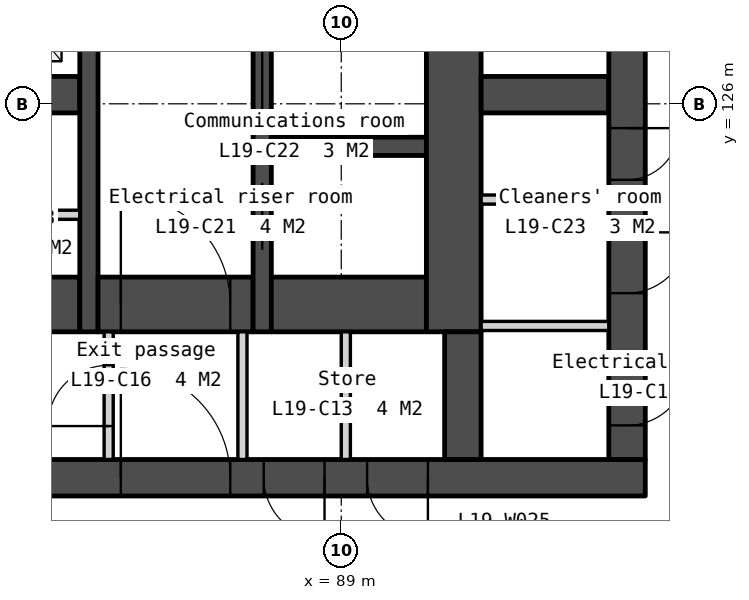
"""IFC4 building model, lengths in metres.
Left out: names, types, materials, properties, quantities, classifications, styles, units other than length and angle.
Written with IfcOpenShell. Run it as: python <this file> out.ifc"""

import sys

from ifc_helpers import new_model, si_unit, direction, frame, frame_2d, origin, place, context, subcontext, project, spatial, polyline, rectangle, outline, extrude, element, fill, save


model = new_model("IFC4")
c1 = context("Model", 3, precision=1e-05, world=origin(), true_north=direction((0.0, 1.0)))
c2 = subcontext(c1, "Body", "Model", "MODEL_VIEW")
j1 = project(units=[si_unit("LENGTHUNIT", "METRE"), si_unit("PLANEANGLEUNIT", "RADIAN")], contexts=[c1])
p1 = place(None, origin())
s1 = spatial("IfcSite", under=j1, at=p1, CompositionType="ELEMENT")
p2 = place(p1, origin())
s2 = spatial("IfcBuilding", under=s1, at=p2, CompositionType="ELEMENT")
p3 = place(p2, frame((0.0, 0.0, 81.8)))
s3 = spatial("IfcBuildingStorey", under=s2, at=p3, CompositionType="ELEMENT", Elevation=81.8)
p4 = place(p3, frame((66.0, 119.85, 0.0), z_axis=(0.0, 0.0, 1.0), x_axis=(1.0, 0.0, 0.0)))
e1 = element("IfcWall", 1, at=p4, inside=s3, PredefinedType="SOLIDWALL", context=c2, shape_type="SweptSolid", body=[
    extrude(rectangle(XDim=28.0, YDim=0.6, at=frame_2d((14.0, 0.0))), origin(), (0.0, 0.0, 1.0), 3.35),
])
p5 = place(p4, frame((6.825, 0.0, 0.0)))
e2 = element("IfcOpeningElement", 2, at=p5, cuts=e1, PredefinedType="OPENING", context=c2, shape_type="SweptSolid", body=[
    extrude(rectangle(XDim=1.8, YDim=2.1, at=frame_2d((0.9, 1.05))), frame((0.0, 0.31, 0.0), z_axis=(0.0, -1.0, 0.0), x_axis=(1.0, 0.0, 0.0)), (0.0, 0.0, 1.0), 0.62),
])
p6 = place(p4, frame((15.85, 0.0, 0.0)))
e3 = element("IfcOpeningElement", 3, at=p6, cuts=e1, PredefinedType="OPENING", context=c2, shape_type="SweptSolid", body=[
    extrude(rectangle(XDim=1.5, YDim=2.1, at=frame_2d((0.75, 1.05))), frame((0.0, 0.31, 0.0), z_axis=(0.0, -1.0, 0.0), x_axis=(1.0, 0.0, 0.0)), (0.0, 0.0, 1.0), 0.62),
])
p7 = place(p4, frame((19.375, 0.0, 0.0)))
e4 = element("IfcOpeningElement", 4, at=p7, cuts=e1, PredefinedType="OPENING", context=c2, shape_type="SweptSolid", body=[
    extrude(rectangle(XDim=1.8, YDim=2.1, at=frame_2d((0.9, 1.05))), frame((0.0, 0.31, 0.0), z_axis=(0.0, -1.0, 0.0), x_axis=(1.0, 0.0, 0.0)), (0.0, 0.0, 1.0), 0.62),
])
p8 = place(p4, frame((4.425, 0.0, 0.0)))
e5 = element("IfcOpeningElement", 5, at=p8, cuts=e1, PredefinedType="OPENING", context=c2, shape_type="SweptSolid", body=[
    extrude(rectangle(XDim=1.0, YDim=2.1, at=frame_2d((0.5, 1.05))), frame((0.0, 0.31, 0.0), z_axis=(0.0, -1.0, 0.0), x_axis=(1.0, 0.0, 0.0)), (0.0, 0.0, 1.0), 0.62),
])
p9 = place(p4, frame((9.783, 0.0, 0.0)))
e6 = element("IfcOpeningElement", 6, at=p9, cuts=e1, PredefinedType="OPENING", context=c2, shape_type="SweptSolid", body=[
    extrude(rectangle(XDim=1.0, YDim=2.1, at=frame_2d((0.5, 1.05))), frame((0.0, 0.31, 0.0), z_axis=(0.0, -1.0, 0.0), x_axis=(1.0, 0.0, 0.0)), (0.0, 0.0, 1.0), 0.62),
])
p10 = place(p4, frame((11.525, 0.0, 0.0)))
e7 = element("IfcOpeningElement", 7, at=p10, cuts=e1, PredefinedType="OPENING", context=c2, shape_type="SweptSolid", body=[
    extrude(rectangle(XDim=1.0, YDim=2.1, at=frame_2d((0.5, 1.05))), frame((0.0, 0.31, 0.0), z_axis=(0.0, -1.0, 0.0), x_axis=(1.0, 0.0, 0.0)), (0.0, 0.0, 1.0), 0.62),
])
p11 = place(p4, frame((13.658, 0.0, 0.0)))
e8 = element("IfcOpeningElement", 8, at=p11, cuts=e1, PredefinedType="OPENING", context=c2, shape_type="SweptSolid", body=[
    extrude(rectangle(XDim=1.0, YDim=2.1, at=frame_2d((0.5, 1.05))), frame((0.0, 0.31, 0.0), z_axis=(0.0, -1.0, 0.0), x_axis=(1.0, 0.0, 0.0)), (0.0, 0.0, 1.0), 0.62),
])
p12 = place(p4, frame((21.725, 0.0, 0.0)))
e9 = element("IfcOpeningElement", 9, at=p12, cuts=e1, PredefinedType="OPENING", context=c2, shape_type="SweptSolid", body=[
    extrude(rectangle(XDim=1.0, YDim=2.1, at=frame_2d((0.5, 1.05))), frame((0.0, 0.31, 0.0), z_axis=(0.0, -1.0, 0.0), x_axis=(1.0, 0.0, 0.0)), (0.0, 0.0, 1.0), 0.62),
])
p13 = place(p4, frame((23.425, 0.0, 0.0)))
e10 = element("IfcOpeningElement", 10, at=p13, cuts=e1, PredefinedType="OPENING", context=c2, shape_type="SweptSolid", body=[
    extrude(rectangle(XDim=1.0, YDim=2.1, at=frame_2d((0.5, 1.05))), frame((0.0, 0.31, 0.0), z_axis=(0.0, -1.0, 0.0), x_axis=(1.0, 0.0, 0.0)), (0.0, 0.0, 1.0), 0.62),
])
p14 = place(p3, frame((81.8, 122.7, 0.0), z_axis=(0.0, 0.0, 1.0), x_axis=(1.0, 0.0, 0.0)))
e11 = element("IfcWall", 11, at=p14, inside=s3, PredefinedType="SOLIDWALL", context=c2, shape_type="SweptSolid", body=[
    extrude(rectangle(XDim=2.9, YDim=0.9, at=frame_2d((1.45, 0.0))), origin(), (0.0, 0.0, 1.0), 3.35),
])
p15 = place(p14, frame((0.05, 0.0, 0.0)))
e12 = element("IfcOpeningElement", 12, at=p15, cuts=e11, PredefinedType="OPENING", context=c2, shape_type="SweptSolid", body=[
    extrude(rectangle(XDim=1.5, YDim=2.1, at=frame_2d((0.75, 1.05))), frame((0.0, 0.46, 0.0), z_axis=(0.0, -1.0, 0.0), x_axis=(1.0, 0.0, 0.0)), (0.0, 0.0, 1.0), 0.92),
])
p16 = place(p3, frame((82.6, 126.15, 0.0), z_axis=(0.0, 0.0, 1.0), x_axis=(1.0, 0.0, 0.0)))
e13 = element("IfcWall", 13, at=p16, inside=s3, PredefinedType="SOLIDWALL", context=c2, shape_type="SweptSolid", body=[
    extrude(rectangle(XDim=2.1, YDim=0.6, at=frame_2d((1.05, 0.0))), origin(), (0.0, 0.0, 1.0), 3.35),
])
p17 = place(p3, frame((83.35, 124.175, 0.0), z_axis=(0.0, 0.0, 1.0), x_axis=(1.0, 0.0, 0.0)))
e14 = element("IfcWall", 14, at=p17, inside=s3, PredefinedType="PARTITIONING", context=c2, shape_type="SweptSolid", body=[
    extrude(rectangle(XDim=1.35, YDim=0.15, at=frame_2d((0.675, 0.0))), origin(), (0.0, 0.0, 1.0), 3.35),
])
p18 = place(p3, frame((84.85, 133.95, 0.0), z_axis=(0.0, 0.0, 1.0), x_axis=(0.0, -1.0, 0.0)))
e15 = element("IfcWall", 15, at=p18, inside=s3, PredefinedType="SOLIDWALL", context=c2, shape_type="SweptSolid", body=[
    extrude(rectangle(XDim=11.7, YDim=0.3, at=frame_2d((5.85, 0.0))), origin(), (0.0, 0.0, 1.0), 3.35),
])
p19 = place(p3, frame((85.0, 122.7, 0.0), z_axis=(0.0, 0.0, 1.0), x_axis=(1.0, 0.0, 0.0)))
e16 = element("IfcWall", 16, at=p19, inside=s3, PredefinedType="SOLIDWALL", context=c2, shape_type="SweptSolid", body=[
    extrude(rectangle(XDim=2.55, YDim=0.9, at=frame_2d((1.275, 0.0))), origin(), (0.0, 0.0, 1.0), 3.35),
])
p20 = place(p19, frame((0.375, 0.0, 0.0)))
e17 = element("IfcOpeningElement", 17, at=p20, cuts=e16, PredefinedType="OPENING", context=c2, shape_type="SweptSolid", body=[
    extrude(rectangle(XDim=1.8, YDim=2.1, at=frame_2d((0.9, 1.05))), frame((0.0, 0.46, 0.0), z_axis=(0.0, -1.0, 0.0), x_axis=(1.0, 0.0, 0.0)), (0.0, 0.0, 1.0), 0.92),
])
p21 = place(p3, frame((85.175, 122.25, 0.0), z_axis=(0.0, 0.0, 1.0), x_axis=(0.0, -1.0, 0.0)))
e18 = element("IfcWall", 18, at=p21, inside=s3, PredefinedType="PARTITIONING", context=c2, shape_type="SweptSolid", body=[
    extrude(rectangle(XDim=2.1, YDim=0.15, at=frame_2d((1.05, 0.0))), origin(), (0.0, 0.0, 1.0), 3.35),
])
p22 = place(p21, frame((0.55, 0.0, 0.0)))
e19 = element("IfcOpeningElement", 19, at=p22, cuts=e18, PredefinedType="OPENING", context=c2, shape_type="SweptSolid", body=[
    extrude(rectangle(XDim=1.0, YDim=2.1, at=frame_2d((0.5, 1.05))), frame((0.0, 0.085, 0.0), z_axis=(0.0, -1.0, 0.0), x_axis=(1.0, 0.0, 0.0)), (0.0, 0.0, 1.0), 0.17),
])
p23 = place(p3, frame((87.375, 122.25, 0.0), z_axis=(0.0, 0.0, 1.0), x_axis=(0.0, -1.0, 0.0)))
e20 = element("IfcWall", 20, at=p23, inside=s3, PredefinedType="PARTITIONING", context=c2, shape_type="SweptSolid", body=[
    extrude(rectangle(XDim=2.1, YDim=0.15, at=frame_2d((1.05, 0.0))), origin(), (0.0, 0.0, 1.0), 3.35),
])
p24 = place(p3, frame((87.7, 133.95, 0.0), z_axis=(0.0, 0.0, 1.0), x_axis=(0.0, -1.0, 0.0)))
e21 = element("IfcWall", 21, at=p24, inside=s3, PredefinedType="SOLIDWALL", context=c2, shape_type="SweptSolid", body=[
    extrude(rectangle(XDim=11.7, YDim=0.3, at=frame_2d((5.85, 0.0))), origin(), (0.0, 0.0, 1.0), 3.35),
])
p25 = place(p24, frame((6.95, 0.0, 0.0)))
e22 = element("IfcOpeningElement", 22, at=p25, cuts=e21, PredefinedType="OPENING", context=c2, shape_type="SweptSolid", body=[
    extrude(rectangle(XDim=1.1, YDim=2.1, at=frame_2d((0.55, 1.05))), frame((0.0, 0.16, 0.0), z_axis=(0.0, -1.0, 0.0), x_axis=(1.0, 0.0, 0.0)), (0.0, 0.0, 1.0), 0.32),
])
p26 = place(p24, frame((5.1, 0.0, 0.0)))
e23 = element("IfcOpeningElement", 23, at=p26, cuts=e21, PredefinedType="OPENING", context=c2, shape_type="SweptSolid", body=[
    extrude(rectangle(XDim=1.0, YDim=2.1, at=frame_2d((0.5, 1.05))), frame((0.0, 0.16, 0.0), z_axis=(0.0, -1.0, 0.0), x_axis=(1.0, 0.0, 0.0)), (0.0, 0.0, 1.0), 0.32),
])
p27 = place(p24, frame((9.25, 0.0, 0.0)))
e24 = element("IfcOpeningElement", 24, at=p27, cuts=e21, PredefinedType="OPENING", context=c2, shape_type="SweptSolid", body=[
    extrude(rectangle(XDim=1.1, YDim=2.1, at=frame_2d((0.55, 1.05))), frame((0.0, 0.16, 0.0), z_axis=(0.0, -1.0, 0.0), x_axis=(1.0, 0.0, 0.0)), (0.0, 0.0, 1.0), 0.32),
])
p28 = place(p3, frame((87.85, 125.3, 0.0), z_axis=(0.0, 0.0, 1.0), x_axis=(1.0, 0.0, 0.0)))
e25 = element("IfcWall", 25, at=p28, inside=s3, PredefinedType="SOLIDWALL", context=c2, shape_type="SweptSolid", body=[
    extrude(rectangle(XDim=2.55, YDim=0.3, at=frame_2d((1.275, 0.0))), origin(), (0.0, 0.0, 1.0), 3.35),
])
p29 = place(p3, frame((87.85, 122.7, 0.0), z_axis=(0.0, 0.0, 1.0), x_axis=(1.0, 0.0, 0.0)))
e26 = element("IfcWall", 26, at=p29, inside=s3, PredefinedType="SOLIDWALL", context=c2, shape_type="SweptSolid", body=[
    extrude(rectangle(XDim=2.55, YDim=0.9, at=frame_2d((1.275, 0.0))), origin(), (0.0, 0.0, 1.0), 3.35),
])
p30 = place(p3, frame((89.075, 122.25, 0.0), z_axis=(0.0, 0.0, 1.0), x_axis=(0.0, -1.0, 0.0)))
e27 = element("IfcWall", 27, at=p30, inside=s3, PredefinedType="PARTITIONING", context=c2, shape_type="SweptSolid", body=[
    extrude(rectangle(XDim=2.1, YDim=0.15, at=frame_2d((1.05, 0.0))), origin(), (0.0, 0.0, 1.0), 3.35),
])
p31 = place(p3, frame((90.85, 133.95, 0.0), z_axis=(0.0, 0.0, 1.0), x_axis=(0.0, -1.0, 0.0)))
e28 = element("IfcWall", 28, at=p31, inside=s3, PredefinedType="SOLIDWALL", context=c2, shape_type="SweptSolid", body=[
    extrude(rectangle(XDim=11.7, YDim=0.9, at=frame_2d((5.85, 0.0))), origin(), (0.0, 0.0, 1.0), 3.35),
])
p32 = place(p3, frame((91.0, 122.25, 0.0), z_axis=(0.0, 0.0, 1.0), x_axis=(0.0, -1.0, 0.0)))
e29 = element("IfcWall", 29, at=p32, inside=s3, PredefinedType="SOLIDWALL", context=c2, shape_type="SweptSolid", body=[
    extrude(rectangle(XDim=2.1, YDim=0.6, at=frame_2d((1.05, 0.0))), origin(), (0.0, 0.0, 1.0), 3.35),
])
p33 = place(p3, frame((91.3, 126.15, 0.0), z_axis=(0.0, 0.0, 1.0), x_axis=(1.0, 0.0, 0.0)))
e30 = element("IfcWall", 30, at=p33, inside=s3, PredefinedType="SOLIDWALL", context=c2, shape_type="SweptSolid", body=[
    extrude(rectangle(XDim=2.1, YDim=0.6, at=frame_2d((1.05, 0.0))), origin(), (0.0, 0.0, 1.0), 3.35),
])
for number, where, z_axis, x_axis in (
    (31, (91.3, 124.425, 0.0), (0.0, 0.0, 1.0), (1.0, 0.0, 0.0)),
    (32, (91.3, 122.346, 0.0), (0.0, 0.0, 1.0), (1.0, 0.0, 0.0)),
):
    element("IfcWall", number, at=place(p3, frame(where, z_axis=z_axis, x_axis=x_axis)), inside=s3, PredefinedType="PARTITIONING", context=c2, shape_type="SweptSolid", body=[
        extrude(rectangle(XDim=2.1, YDim=0.15, at=frame_2d((1.05, 0.0))), origin(), (0.0, 0.0, 1.0), 3.35),
    ])
p34 = place(p3, frame((93.7, 133.95, 0.0), z_axis=(0.0, 0.0, 1.0), x_axis=(0.0, -1.0, 0.0)))
e33 = element("IfcWall", 33, at=p34, inside=s3, PredefinedType="SOLIDWALL", context=c2, shape_type="SweptSolid", body=[
    extrude(rectangle(XDim=13.8, YDim=0.6, at=frame_2d((6.9, 0.0))), origin(), (0.0, 0.0, 1.0), 3.35),
])
p35 = place(p34, frame((0.6, 0.0, 0.0)))
e34 = element("IfcOpeningElement", 34, at=p35, cuts=e33, PredefinedType="OPENING", context=c2, shape_type="SweptSolid", body=[
    extrude(rectangle(XDim=1.1, YDim=2.1, at=frame_2d((0.55, 1.05))), frame((0.0, 0.31, 0.0), z_axis=(0.0, -1.0, 0.0), x_axis=(1.0, 0.0, 0.0)), (0.0, 0.0, 1.0), 0.62),
])
p36 = place(p34, frame((10.064, 0.0, 0.0)))
e35 = element("IfcOpeningElement", 35, at=p36, cuts=e33, PredefinedType="OPENING", context=c2, shape_type="SweptSolid", body=[
    extrude(rectangle(XDim=1.0, YDim=2.1, at=frame_2d((0.5, 1.05))), frame((0.0, 0.31, 0.0), z_axis=(0.0, -1.0, 0.0), x_axis=(1.0, 0.0, 0.0)), (0.0, 0.0, 1.0), 0.62),
])
p37 = place(p34, frame((8.35, 0.0, 0.0)))
e36 = element("IfcOpeningElement", 36, at=p37, cuts=e33, PredefinedType="OPENING", context=c2, shape_type="SweptSolid", body=[
    extrude(rectangle(XDim=0.85, YDim=2.1, at=frame_2d((0.425, 1.05))), frame((0.0, 0.31, 0.0), z_axis=(0.0, -1.0, 0.0), x_axis=(1.0, 0.0, 0.0)), (0.0, 0.0, 1.0), 0.62),
])
p38 = place(p34, frame((12.239, 0.0, 0.0)))
e37 = element("IfcOpeningElement", 37, at=p38, cuts=e33, PredefinedType="OPENING", context=c2, shape_type="SweptSolid", body=[
    extrude(rectangle(XDim=1.0, YDim=2.1, at=frame_2d((0.5, 1.05))), frame((0.0, 0.31, 0.0), z_axis=(0.0, -1.0, 0.0), x_axis=(1.0, 0.0, 0.0)), (0.0, 0.0, 1.0), 0.62),
])
p39 = place(p3, frame((82.605, 93.333, -0.45), z_axis=(0.0, 0.0, 1.0), x_axis=(0.500000478905, 0.866025127289, 0.0)))
e38 = element("IfcWall", 38, at=p39, inside=s3, PredefinedType="SOLIDWALL", context=c2, shape_type="SweptSolid", body=[
    extrude(outline(polyline([(42.643, 0.0), (42.643, 3.8), (0.0, 3.8), (0.0, 0.0), (42.643, 0.0)])), frame((0.0, 0.225, 0.0), z_axis=(0.0, -1.0, 0.0), x_axis=(1.0, 0.0, 0.0)), (0.0, 0.0, 1.0), 0.45),
])
p40 = place(p39, frame((2.814, 0.0, 1.35)))
e39 = element("IfcOpeningElement", 39, at=p40, cuts=e38, PredefinedType="OPENING", context=c2, shape_type="SweptSolid", body=[
    extrude(rectangle(XDim=1.2, YDim=1.5, at=frame_2d((0.6, 0.75))), frame((0.0, 0.235, 0.0), z_axis=(0.0, -1.0, 0.0), x_axis=(1.0, 0.0, 0.0)), (0.0, 0.0, 1.0), 0.47),
])
p41 = place(p39, frame((4.514, 0.0, 1.35)))
e40 = element("IfcOpeningElement", 40, at=p41, cuts=e38, PredefinedType="OPENING", context=c2, shape_type="SweptSolid", body=[
    extrude(rectangle(XDim=1.2, YDim=1.5, at=frame_2d((0.6, 0.75))), frame((0.0, 0.235, 0.0), z_axis=(0.0, -1.0, 0.0), x_axis=(1.0, 0.0, 0.0)), (0.0, 0.0, 1.0), 0.47),
])
p42 = place(p39, frame((11.343, 0.0, 1.35)))
e41 = element("IfcOpeningElement", 41, at=p42, cuts=e38, PredefinedType="OPENING", context=c2, shape_type="SweptSolid", body=[
    extrude(rectangle(XDim=1.2, YDim=1.5, at=frame_2d((0.6, 0.75))), frame((0.0, 0.235, 0.0), z_axis=(0.0, -1.0, 0.0), x_axis=(1.0, 0.0, 0.0)), (0.0, 0.0, 1.0), 0.47),
])
p43 = place(p39, frame((13.043, 0.0, 1.35)))
e42 = element("IfcOpeningElement", 42, at=p43, cuts=e38, PredefinedType="OPENING", context=c2, shape_type="SweptSolid", body=[
    extrude(rectangle(XDim=1.2, YDim=1.5, at=frame_2d((0.6, 0.75))), frame((0.0, 0.235, 0.0), z_axis=(0.0, -1.0, 0.0), x_axis=(1.0, 0.0, 0.0)), (0.0, 0.0, 1.0), 0.47),
])
p44 = place(p39, frame((19.872, 0.0, 1.35)))
e43 = element("IfcOpeningElement", 43, at=p44, cuts=e38, PredefinedType="OPENING", context=c2, shape_type="SweptSolid", body=[
    extrude(rectangle(XDim=1.2, YDim=1.5, at=frame_2d((0.6, 0.75))), frame((0.0, 0.235, 0.0), z_axis=(0.0, -1.0, 0.0), x_axis=(1.0, 0.0, 0.0)), (0.0, 0.0, 1.0), 0.47),
])
p45 = place(p39, frame((21.572, 0.0, 1.35)))
e44 = element("IfcOpeningElement", 44, at=p45, cuts=e38, PredefinedType="OPENING", context=c2, shape_type="SweptSolid", body=[
    extrude(rectangle(XDim=1.2, YDim=1.5, at=frame_2d((0.6, 0.75))), frame((0.0, 0.235, 0.0), z_axis=(0.0, -1.0, 0.0), x_axis=(1.0, 0.0, 0.0)), (0.0, 0.0, 1.0), 0.47),
])
p46 = place(p39, frame((28.4, 0.0, 1.35)))
e45 = element("IfcOpeningElement", 45, at=p46, cuts=e38, PredefinedType="OPENING", context=c2, shape_type="SweptSolid", body=[
    extrude(rectangle(XDim=1.2, YDim=1.5, at=frame_2d((0.6, 0.75))), frame((0.0, 0.235, 0.0), z_axis=(0.0, -1.0, 0.0), x_axis=(1.0, 0.0, 0.0)), (0.0, 0.0, 1.0), 0.47),
])
p47 = place(p39, frame((30.1, 0.0, 1.35)))
e46 = element("IfcOpeningElement", 46, at=p47, cuts=e38, PredefinedType="OPENING", context=c2, shape_type="SweptSolid", body=[
    extrude(rectangle(XDim=1.2, YDim=1.5, at=frame_2d((0.6, 0.75))), frame((0.0, 0.235, 0.0), z_axis=(0.0, -1.0, 0.0), x_axis=(1.0, 0.0, 0.0)), (0.0, 0.0, 1.0), 0.47),
])
p48 = place(p39, frame((36.929, 0.0, 1.35)))
e47 = element("IfcOpeningElement", 47, at=p48, cuts=e38, PredefinedType="OPENING", context=c2, shape_type="SweptSolid", body=[
    extrude(rectangle(XDim=1.2, YDim=1.5, at=frame_2d((0.6, 0.75))), frame((0.0, 0.235, 0.0), z_axis=(0.0, -1.0, 0.0), x_axis=(1.0, 0.0, 0.0)), (0.0, 0.0, 1.0), 0.47),
])
p49 = place(p39, frame((38.629, 0.0, 1.35)))
e48 = element("IfcOpeningElement", 48, at=p49, cuts=e38, PredefinedType="OPENING", context=c2, shape_type="SweptSolid", body=[
    extrude(rectangle(XDim=1.2, YDim=1.5, at=frame_2d((0.6, 0.75))), frame((0.0, 0.235, 0.0), z_axis=(0.0, -1.0, 0.0), x_axis=(1.0, 0.0, 0.0)), (0.0, 0.0, 1.0), 0.47),
])
p50 = place(p36, origin())
e49 = element("IfcDoor", 49, at=p50, inside=s3, OperationType="SINGLE_SWING_LEFT", PredefinedType="DOOR", context=c2, shape_type="SweptSolid", body=[
    extrude(rectangle(XDim=1.0, YDim=2.1, at=frame_2d((0.5, 1.05))), frame((0.0, 0.025, 0.0), z_axis=(0.0, -1.0, 0.0), x_axis=(1.0, 0.0, 0.0)), (0.0, 0.0, 1.0), 0.05),
])
fill(e35, e49)
p51 = place(p37, origin())
e50 = element("IfcDoor", 50, at=p51, inside=s3, OperationType="SINGLE_SWING_LEFT", PredefinedType="DOOR", context=c2, shape_type="SweptSolid", body=[
    extrude(rectangle(XDim=0.85, YDim=2.1, at=frame_2d((0.425, 1.05))), frame((0.0, 0.025, 0.0), z_axis=(0.0, -1.0, 0.0), x_axis=(1.0, 0.0, 0.0)), (0.0, 0.0, 1.0), 0.05),
])
fill(e36, e50)
p52 = place(p38, origin())
e51 = element("IfcDoor", 51, at=p52, inside=s3, OperationType="SINGLE_SWING_LEFT", PredefinedType="DOOR", context=c2, shape_type="SweptSolid", body=[
    extrude(rectangle(XDim=1.0, YDim=2.1, at=frame_2d((0.5, 1.05))), frame((0.0, 0.025, 0.0), z_axis=(0.0, -1.0, 0.0), x_axis=(1.0, 0.0, 0.0)), (0.0, 0.0, 1.0), 0.05),
])
fill(e37, e51)
p53 = place(p25, origin())
e52 = element("IfcDoor", 52, at=p53, inside=s3, OperationType="SLIDING_TO_LEFT", PredefinedType="DOOR", context=c2, shape_type="SweptSolid", body=[
    extrude(rectangle(XDim=1.1, YDim=2.1, at=frame_2d((0.55, 1.05))), frame((0.0, 0.025, 0.0), z_axis=(0.0, -1.0, 0.0), x_axis=(1.0, 0.0, 0.0)), (0.0, 0.0, 1.0), 0.05),
])
fill(e22, e52)
p54 = place(p20, origin())
e53 = element("IfcDoor", 53, at=p54, inside=s3, OperationType="DOUBLE_DOOR_DOUBLE_SWING", PredefinedType="DOOR", context=c2, shape_type="SweptSolid", body=[
    extrude(rectangle(XDim=1.8, YDim=2.1, at=frame_2d((0.9, 1.05))), frame((0.0, 0.025, 0.0), z_axis=(0.0, -1.0, 0.0), x_axis=(1.0, 0.0, 0.0)), (0.0, 0.0, 1.0), 0.05),
])
fill(e17, e53)
p55 = place(p7, origin())
e54 = element("IfcDoor", 54, at=p55, inside=s3, OperationType="DOUBLE_DOOR_DOUBLE_SWING", PredefinedType="DOOR", context=c2, shape_type="SweptSolid", body=[
    extrude(rectangle(XDim=1.8, YDim=2.1, at=frame_2d((0.9, 1.05))), frame((0.0, 0.025, 0.0), z_axis=(0.0, -1.0, 0.0), x_axis=(1.0, 0.0, 0.0)), (0.0, 0.0, 1.0), 0.05),
])
fill(e4, e54)
p56 = place(p22, origin())
e55 = element("IfcDoor", 55, at=p56, inside=s3, OperationType="SINGLE_SWING_RIGHT", PredefinedType="DOOR", context=c2, shape_type="SweptSolid", body=[
    extrude(rectangle(XDim=1.0, YDim=2.1, at=frame_2d((0.5, 1.05))), frame((0.0, 0.025, 0.0), z_axis=(0.0, -1.0, 0.0), x_axis=(1.0, 0.0, 0.0)), (0.0, 0.0, 1.0), 0.05),
])
fill(e19, e55)
p57 = place(p12, origin())
e56 = element("IfcDoor", 56, at=p57, inside=s3, OperationType="SINGLE_SWING_RIGHT", PredefinedType="DOOR", context=c2, shape_type="SweptSolid", body=[
    extrude(rectangle(XDim=1.0, YDim=2.1, at=frame_2d((0.5, 1.05))), frame((0.0, 0.025, 0.0), z_axis=(0.0, -1.0, 0.0), x_axis=(1.0, 0.0, 0.0)), (0.0, 0.0, 1.0), 0.05),
])
fill(e9, e56)
p58 = place(p13, origin())
e57 = element("IfcDoor", 57, at=p58, inside=s3, OperationType="SINGLE_SWING_RIGHT", PredefinedType="DOOR", context=c2, shape_type="SweptSolid", body=[
    extrude(rectangle(XDim=1.0, YDim=2.1, at=frame_2d((0.5, 1.05))), frame((0.0, 0.025, 0.0), z_axis=(0.0, -1.0, 0.0), x_axis=(1.0, 0.0, 0.0)), (0.0, 0.0, 1.0), 0.05),
])
fill(e10, e57)
p59 = place(p27, origin())
e58 = element("IfcDoor", 58, at=p59, inside=s3, OperationType="SLIDING_TO_LEFT", PredefinedType="DOOR", context=c2, shape_type="SweptSolid", body=[
    extrude(rectangle(XDim=1.1, YDim=2.1, at=frame_2d((0.55, 1.05))), frame((0.0, 0.025, 0.0), z_axis=(0.0, -1.0, 0.0), x_axis=(1.0, 0.0, 0.0)), (0.0, 0.0, 1.0), 0.05),
])
fill(e24, e58)
save(model, sys.argv[1])
